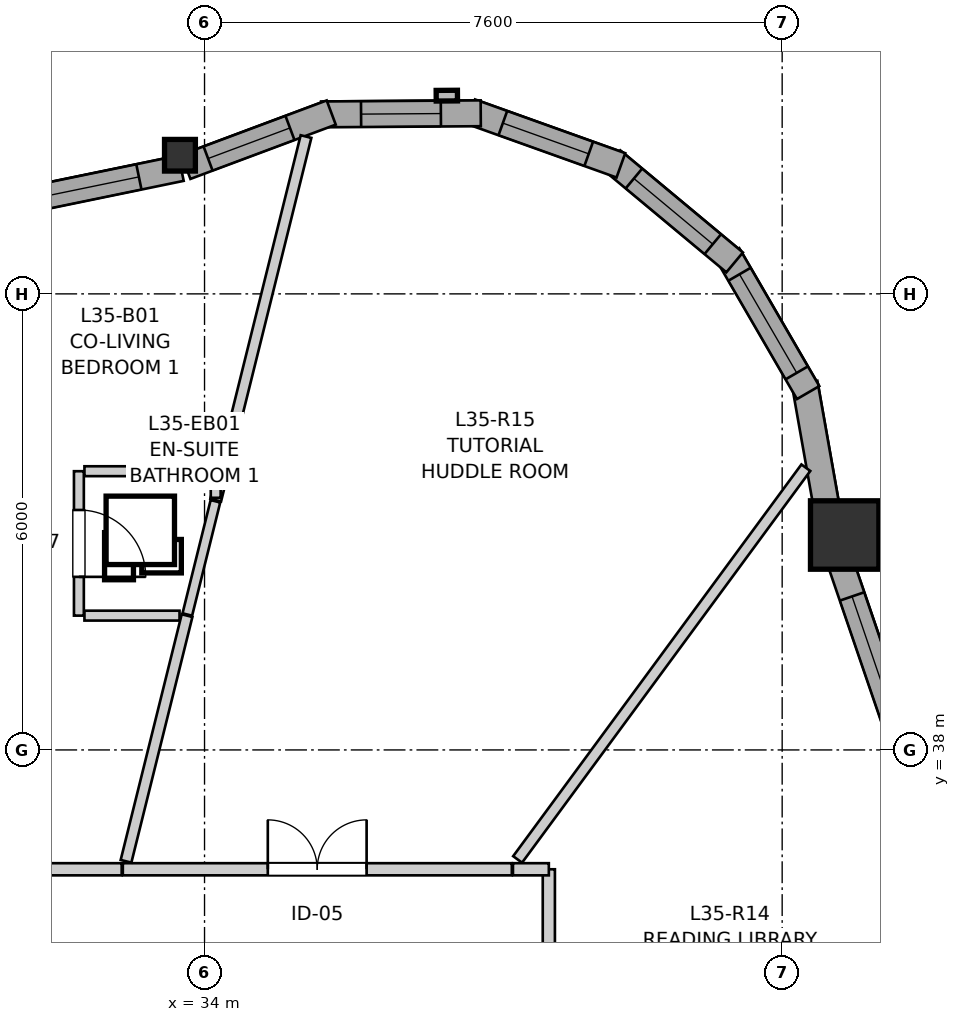
"""IFC4 building model, lengths in metres.
Left out: names, types, materials, properties, quantities, classifications, styles, units other than length and angle.
Written with IfcOpenShell. Run it as: python <this file> out.ifc"""

import sys

from ifc_helpers import new_model, si_unit, direction, frame, frame_2d, origin, origin_2d, place, context, subcontext, project, spatial, rectangle, i_section, extrude, source, transform, mapped, element, fill, save


model = new_model("IFC4")
c1 = context("Model", 3, precision=1e-05, world=origin(), true_north=direction((0.0, 1.0)))
c2 = subcontext(c1, "Body", "Model", "MODEL_VIEW")
j1 = project(units=[si_unit("LENGTHUNIT", "METRE"), si_unit("PLANEANGLEUNIT", "RADIAN")], contexts=[c1])
p1 = place(None, origin())
s1 = spatial("IfcSite", under=j1, at=p1, CompositionType="ELEMENT")
p2 = place(p1, origin())
s2 = spatial("IfcBuilding", under=s1, at=p2, CompositionType="ELEMENT")
p3 = place(p2, frame((0.0, 0.0, 118.4)))
s3 = spatial("IfcBuildingStorey", under=s2, at=p3, CompositionType="ELEMENT", Elevation=118.4)
m1 = source(origin(), c2, "Body", "SweptSolid", [
    extrude(rectangle(XDim=0.9, YDim=0.9, at=origin_2d()), origin(), (0.0, 0.0, 1.0), 2.95),
])
p4 = place(p3, frame((42.423, 40.828, 0.0), z_axis=(0.0, 0.0, 1.0), x_axis=(1.0, 0.0, 0.0)))
e1 = element("IfcColumn", 1, at=p4, inside=s3, PredefinedType="COLUMN", context=c2, shape_type="MappedRepresentation", body=[
    mapped(m1, transform((0.0, 0.0, 0.0), x_axis=(1.0, 0.0, 0.0), y_axis=(0.0, 1.0, 0.0), z_axis=(0.0, 0.0, 1.0), scale=1.0)),
])
m2 = source(origin(), c2, "Body", "SweptSolid", [
    extrude(i_section(OverallWidth=0.406, OverallDepth=0.416, WebThickness=0.027, FlangeThickness=0.044, FilletRadius=0.015, at=origin_2d()), origin(), (0.0, 0.0, 1.0), 2.95),
])
p5 = place(p3, frame((33.677, 45.824, 0.0), z_axis=(0.0, 0.0, 1.0), x_axis=(1.0, 0.0, 0.0)))
e2 = element("IfcColumn", 2, at=p5, inside=s3, PredefinedType="PILASTER", context=c2, shape_type="MappedRepresentation", body=[
    mapped(m2, transform((0.0, 0.0, 0.0), x_axis=(1.0, 0.0, 0.0), y_axis=(0.0, 1.0, 0.0), z_axis=(0.0, 0.0, 1.0), scale=1.0)),
])
p6 = place(p3, frame((43.288, 37.771, 0.0), z_axis=(0.0, 0.0, 1.0), x_axis=(-0.323537149191, 0.94621546864, 0.0)))
e3 = element("IfcWall", 3, at=p6, inside=s3, PredefinedType="SOLIDWALL", context=c2, shape_type="SweptSolid", body=[
    extrude(rectangle(XDim=2.942, YDim=0.34, at=frame_2d((1.471, 0.0))), origin(), (0.0, 0.0, 1.0), 2.48),
])
p7 = place(p6, frame((0.576, 0.0, 0.82)))
e4 = element("IfcOpeningElement", 4, at=p7, cuts=e3, PredefinedType="OPENING", context=c2, shape_type="SweptSolid", body=[
    extrude(rectangle(XDim=1.8, YDim=1.45, at=frame_2d((0.9, 0.725))), frame((0.0, 0.18, 0.0), z_axis=(0.0, -1.0, 0.0), x_axis=(1.0, 0.0, 0.0)), (0.0, 0.0, 1.0), 0.36),
])
p8 = place(p3, frame((42.215, 41.024, 0.0), z_axis=(0.0, 0.0, 1.0), x_axis=(-0.17440141227, 0.984674640375, 0.0)))
e5 = element("IfcWall", 5, at=p8, inside=s3, PredefinedType="SOLIDWALL", context=c2, shape_type="SweptSolid", body=[
    extrude(rectangle(XDim=1.831, YDim=0.34, at=frame_2d((0.916, 0.0))), origin(), (0.0, 0.0, 1.0), 2.48),
])
p9 = place(p3, frame((41.942, 42.701, 0.0), z_axis=(0.0, 0.0, 1.0), x_axis=(-0.501902596059, 0.864924149315, 0.0)))
e6 = element("IfcWall", 6, at=p9, inside=s3, PredefinedType="SOLIDWALL", context=c2, shape_type="SweptSolid", body=[
    extrude(rectangle(XDim=2.099, YDim=0.34, at=frame_2d((1.049, 0.0))), origin(), (0.0, 0.0, 1.0), 2.48),
])
p10 = place(p9, frame((0.3, 0.0, 0.82)))
e7 = element("IfcOpeningElement", 7, at=p10, cuts=e6, PredefinedType="OPENING", context=c2, shape_type="SweptSolid", body=[
    extrude(rectangle(XDim=1.5, YDim=1.45, at=frame_2d((0.75, 0.725))), frame((0.0, 0.18, 0.0), z_axis=(0.0, -1.0, 0.0), x_axis=(1.0, 0.0, 0.0)), (0.0, 0.0, 1.0), 0.36),
])
p11 = place(p3, frame((40.975, 44.414, 0.0), z_axis=(0.0, 0.0, 1.0), x_axis=(-0.768440501876, 0.639921241308, 0.0)))
e8 = element("IfcWall", 8, at=p11, inside=s3, PredefinedType="SOLIDWALL", context=c2, shape_type="SweptSolid", body=[
    extrude(rectangle(XDim=2.099, YDim=0.34, at=frame_2d((1.05, 0.0))), origin(), (0.0, 0.0, 1.0), 2.48),
])
p12 = place(p11, frame((0.375, 0.0, 0.82)))
e9 = element("IfcOpeningElement", 9, at=p12, cuts=e8, PredefinedType="OPENING", context=c2, shape_type="SweptSolid", body=[
    extrude(rectangle(XDim=1.35, YDim=1.45, at=frame_2d((0.675, 0.725))), frame((0.0, 0.18, 0.0), z_axis=(0.0, -1.0, 0.0), x_axis=(1.0, 0.0, 0.0)), (0.0, 0.0, 1.0), 0.36),
])
p13 = place(p3, frame((39.478, 45.691, 0.0), z_axis=(0.0, 0.0, 1.0), x_axis=(-0.941523304278, 0.336947870598, 0.0)))
e10 = element("IfcWall", 10, at=p13, inside=s3, PredefinedType="SOLIDWALL", context=c2, shape_type="SweptSolid", body=[
    extrude(rectangle(XDim=2.099, YDim=0.34, at=frame_2d((1.05, 0.0))), origin(), (0.0, 0.0, 1.0), 2.48),
])
p14 = place(p13, frame((0.449, 0.0, 0.82)))
e11 = element("IfcOpeningElement", 11, at=p14, cuts=e10, PredefinedType="OPENING", context=c2, shape_type="SweptSolid", body=[
    extrude(rectangle(XDim=1.2, YDim=1.45, at=frame_2d((0.6, 0.725))), frame((0.0, 0.18, 0.0), z_axis=(0.0, -1.0, 0.0), x_axis=(1.0, 0.0, 0.0)), (0.0, 0.0, 1.0), 0.36),
])
p15 = place(p3, frame((37.634, 46.376, 0.0), z_axis=(0.0, 0.0, 1.0), x_axis=(-0.999976456891, -0.00686189939, 0.0)))
e12 = element("IfcWall", 12, at=p15, inside=s3, PredefinedType="SOLIDWALL", context=c2, shape_type="SweptSolid", body=[
    extrude(rectangle(XDim=2.099, YDim=0.34, at=frame_2d((1.05, 0.0))), origin(), (0.0, 0.0, 1.0), 2.48),
])
p16 = place(p15, frame((0.524, 0.0, 0.82)))
e13 = element("IfcOpeningElement", 13, at=p16, cuts=e12, PredefinedType="OPENING", context=c2, shape_type="SweptSolid", body=[
    extrude(rectangle(XDim=1.05, YDim=1.45, at=frame_2d((0.525, 0.725))), frame((0.0, 0.18, 0.0), z_axis=(0.0, -1.0, 0.0), x_axis=(1.0, 0.0, 0.0)), (0.0, 0.0, 1.0), 0.36),
])
p17 = place(p3, frame((35.667, 46.386, 0.0), z_axis=(0.0, 0.0, 1.0), x_axis=(-0.936761017964, -0.34996970615, 0.0)))
e14 = element("IfcWall", 14, at=p17, inside=s3, PredefinedType="SOLIDWALL", context=c2, shape_type="SweptSolid", body=[
    extrude(rectangle(XDim=2.041, YDim=0.34, at=frame_2d((1.021, 0.0))), origin(), (0.0, 0.0, 1.0), 2.48),
])
p18 = place(p17, frame((0.579, 0.0, 0.82)))
e15 = element("IfcOpeningElement", 15, at=p18, cuts=e14, PredefinedType="OPENING", context=c2, shape_type="SweptSolid", body=[
    extrude(rectangle(XDim=1.15, YDim=1.2, at=frame_2d((0.575, 0.6))), frame((0.0, 0.18, 0.0), z_axis=(0.0, -1.0, 0.0), x_axis=(1.0, 0.0, 0.0)), (0.0, 0.0, 1.0), 0.36),
])
p19 = place(p3, frame((33.691, 45.653, 0.0), z_axis=(0.0, 0.0, 1.0), x_axis=(-0.979414063846, -0.201861565287, 0.0)))
e16 = element("IfcWall", 16, at=p19, inside=s3, PredefinedType="SOLIDWALL", context=c2, shape_type="SweptSolid", body=[
    extrude(rectangle(XDim=3.104, YDim=0.34, at=frame_2d((1.552, 0.0))), origin(), (0.0, 0.0, 1.0), 2.48),
])
p20 = place(p19, frame((0.567, 0.0, 0.82)))
e17 = element("IfcOpeningElement", 17, at=p20, cuts=e16, PredefinedType="OPENING", context=c2, shape_type="SweptSolid", body=[
    extrude(rectangle(XDim=1.95, YDim=1.4, at=frame_2d((0.975, 0.7))), frame((0.0, 0.18, 0.0), z_axis=(0.0, -1.0, 0.0), x_axis=(1.0, 0.0, 0.0)), (0.0, 0.0, 1.0), 0.36),
])
p21 = place(p3, frame((38.53, 36.43, 0.0), z_axis=(0.0, 0.0, 1.0), x_axis=(0.0, -1.0, 0.0)))
e18 = element("IfcWall", 18, at=p21, inside=s3, PredefinedType="PARTITIONING", context=c2, shape_type="SweptSolid", body=[
    extrude(rectangle(XDim=7.083, YDim=0.16, at=frame_2d((3.542, 0.0))), origin(), (0.0, 0.0, 1.0), 2.588),
])
p22 = place(p21, frame((3.053, 0.0, 0.0)))
e19 = element("IfcOpeningElement", 19, at=p22, cuts=e18, PredefinedType="OPENING", context=c2, shape_type="SweptSolid", body=[
    extrude(rectangle(XDim=0.96, YDim=2.1, at=frame_2d((0.48, 1.05))), frame((0.0, 0.09, 0.0), z_axis=(0.0, -1.0, 0.0), x_axis=(1.0, 0.0, 0.0)), (0.0, 0.0, 1.0), 0.18),
])
p23 = place(p3, frame((32.925, 36.43, 0.0), z_axis=(0.0, 0.0, 1.0), x_axis=(1.0, 0.0, 0.0)))
e20 = element("IfcWall", 20, at=p23, inside=s3, PredefinedType="PARTITIONING", context=c2, shape_type="SweptSolid", body=[
    extrude(rectangle(XDim=5.118, YDim=0.16, at=frame_2d((2.559, 0.0))), origin(), (0.0, 0.0, 1.0), 2.588),
])
p24 = place(p23, frame((1.907, 0.0, 0.0)))
e21 = element("IfcOpeningElement", 21, at=p24, cuts=e20, PredefinedType="OPENING", context=c2, shape_type="SweptSolid", body=[
    extrude(rectangle(XDim=1.3, YDim=2.1, at=frame_2d((0.65, 1.05))), frame((0.0, 0.09, 0.0), z_axis=(0.0, -1.0, 0.0), x_axis=(1.0, 0.0, 0.0)), (0.0, 0.0, 1.0), 0.18),
])
p25 = place(p3, frame((30.063, 36.43, 0.0), z_axis=(0.0, 0.0, 1.0), x_axis=(1.0, 0.0, 0.0)))
e22 = element("IfcWall", 22, at=p25, inside=s3, PredefinedType="PARTITIONING", context=c2, shape_type="SweptSolid", body=[
    extrude(rectangle(XDim=2.847, YDim=0.16, at=frame_2d((1.423, 0.0))), origin(), (0.0, 0.0, 1.0), 2.95),
])
p26 = place(p25, frame((0.964, 0.0, 0.0)))
e23 = element("IfcOpeningElement", 23, at=p26, cuts=e22, PredefinedType="OPENING", context=c2, shape_type="SweptSolid", body=[
    extrude(rectangle(XDim=0.92, YDim=2.1, at=frame_2d((0.46, 1.05))), frame((0.0, 0.09, 0.0), z_axis=(0.0, -1.0, 0.0), x_axis=(1.0, 0.0, 0.0)), (0.0, 0.0, 1.0), 0.18),
])
p27 = place(p3, frame((32.347, 41.667, 0.0), z_axis=(0.0, 0.0, 1.0), x_axis=(0.0, -1.0, 0.0)))
e24 = element("IfcWall", 24, at=p27, inside=s3, PredefinedType="PARTITIONING", context=c2, shape_type="SweptSolid", body=[
    extrude(rectangle(XDim=1.9, YDim=0.13, at=frame_2d((0.95, 0.0))), origin(), (0.0, 0.0, 1.0), 2.95),
])
p28 = place(p27, frame((0.51, 0.0, 0.0)))
e25 = element("IfcOpeningElement", 25, at=p28, cuts=e24, PredefinedType="OPENING", context=c2, shape_type="SweptSolid", body=[
    extrude(rectangle(XDim=0.88, YDim=2.05, at=frame_2d((0.44, 1.025))), frame((0.0, 0.075, 0.0), z_axis=(0.0, -1.0, 0.0), x_axis=(1.0, 0.0, 0.0)), (0.0, 0.0, 1.0), 0.15),
])
p29 = place(p3, frame((38.119, 36.559, 0.0), z_axis=(0.0, 0.0, 1.0), x_axis=(0.592704345809, 0.805420113021, 0.0)))
e26 = element("IfcWall", 26, at=p29, inside=s3, PredefinedType="PARTITIONING", context=c2, shape_type="SweptSolid", body=[
    extrude(rectangle(XDim=6.399, YDim=0.145, at=frame_2d((3.199, 0.0))), origin(), (0.0, 0.0, 1.0), 2.95),
])
p30 = place(p3, frame((34.147, 41.286, 0.0), z_axis=(0.0, 0.0, 1.0), x_axis=(0.241055314039, 0.970511378384, 0.0)))
e27 = element("IfcWall", 27, at=p30, inside=s3, PredefinedType="PARTITIONING", context=c2, shape_type="SweptSolid", body=[
    extrude(rectangle(XDim=4.929, YDim=0.145, at=frame_2d((2.465, 0.0))), origin(), (0.0, 0.0, 1.0), 2.95),
])
p31 = place(p3, frame((32.967, 36.535, 0.0), z_axis=(0.0, 0.0, 1.0), x_axis=(0.241120890255, 0.970495088232, 0.0)))
e28 = element("IfcWall", 28, at=p31, inside=s3, PredefinedType="PARTITIONING", context=c2, shape_type="SweptSolid", body=[
    extrude(rectangle(XDim=3.33, YDim=0.145, at=frame_2d((1.665, 0.0))), origin(), (0.0, 0.0, 1.0), 2.95),
])
p32 = place(p3, frame((32.42, 41.667, 0.0), z_axis=(0.0, 0.0, 1.0), x_axis=(1.0, 0.0, 0.0)))
e29 = element("IfcWall", 29, at=p32, inside=s3, PredefinedType="PARTITIONING", context=c2, shape_type="SweptSolid", body=[
    extrude(rectangle(XDim=1.628, YDim=0.13, at=frame_2d((0.814, 0.0))), origin(), (0.0, 0.0, 1.0), 2.95),
])
p33 = place(p3, frame((33.774, 39.781, 0.0), z_axis=(0.0, 0.0, 1.0), x_axis=(0.240776504653, 0.970580586457, 0.0)))
e30 = element("IfcWall", 30, at=p33, inside=s3, PredefinedType="PARTITIONING", context=c2, shape_type="SweptSolid", body=[
    extrude(rectangle(XDim=1.535, YDim=0.13, at=frame_2d((0.768, 0.0))), origin(), (0.0, 0.0, 1.0), 2.95),
])
p34 = place(p3, frame((32.42, 39.767, 0.0), z_axis=(0.0, 0.0, 1.0), x_axis=(1.0, 0.0, 0.0)))
e31 = element("IfcWall", 31, at=p34, inside=s3, PredefinedType="PARTITIONING", context=c2, shape_type="SweptSolid", body=[
    extrude(rectangle(XDim=1.251, YDim=0.13, at=frame_2d((0.625, 0.0))), origin(), (0.0, 0.0, 1.0), 2.95),
])
p35 = place(p3, frame((38.058, 36.43, 0.0), z_axis=(0.0, 0.0, 1.0), x_axis=(1.0, 0.0, 0.0)))
e32 = element("IfcWall", 32, at=p35, inside=s3, PredefinedType="PARTITIONING", context=c2, shape_type="SweptSolid", body=[
    extrude(rectangle(XDim=0.472, YDim=0.16, at=frame_2d((0.236, 0.0))), origin(), (0.0, 0.0, 1.0), 2.588),
])
p36 = place(p3, frame((34.147, 41.317, 0.0), z_axis=(0.0, 0.0, 1.0), x_axis=(0.0, 1.0, 0.0)))
e33 = element("IfcWall", 33, at=p36, inside=s3, PredefinedType="PARTITIONING", context=c2, shape_type="SweptSolid", body=[
    extrude(rectangle(XDim=0.35, YDim=0.13, at=frame_2d((0.175, 0.0))), origin(), (0.0, 0.0, 1.0), 2.95),
])
m3 = source(origin(), c2, "Body", "SweptSolid", [
    extrude(rectangle(XDim=1.8, YDim=1.45, at=frame_2d((0.9, 0.725))), frame((0.0, 0.03, 0.0), z_axis=(0.0, -1.0, 0.0), x_axis=(1.0, 0.0, 0.0)), (0.0, 0.0, 1.0), 0.06),
])
p37 = place(p7, origin())
e34 = element("IfcWindow", 34, at=p37, inside=s3, PartitioningType="SINGLE_PANEL", PredefinedType="WINDOW", context=c2, shape_type="MappedRepresentation", body=[
    mapped(m3, transform((0.0, 0.0, 0.0), x_axis=(1.0, 0.0, 0.0), y_axis=(0.0, 1.0, 0.0), z_axis=(0.0, 0.0, 1.0), scale=1.0)),
])
fill(e4, e34)
m4 = source(origin(), c2, "Body", "SweptSolid", [
    extrude(rectangle(XDim=1.5, YDim=1.45, at=frame_2d((0.75, 0.725))), frame((0.0, 0.03, 0.0), z_axis=(0.0, -1.0, 0.0), x_axis=(1.0, 0.0, 0.0)), (0.0, 0.0, 1.0), 0.06),
])
p38 = place(p10, origin())
e35 = element("IfcWindow", 35, at=p38, inside=s3, PartitioningType="SINGLE_PANEL", PredefinedType="WINDOW", context=c2, shape_type="MappedRepresentation", body=[
    mapped(m4, transform((0.0, 0.0, 0.0), x_axis=(1.0, 0.0, 0.0), y_axis=(0.0, 1.0, 0.0), z_axis=(0.0, 0.0, 1.0), scale=1.0)),
])
fill(e7, e35)
m5 = source(origin(), c2, "Body", "SweptSolid", [
    extrude(rectangle(XDim=1.35, YDim=1.45, at=frame_2d((0.675, 0.725))), frame((0.0, 0.03, 0.0), z_axis=(0.0, -1.0, 0.0), x_axis=(1.0, 0.0, 0.0)), (0.0, 0.0, 1.0), 0.06),
])
p39 = place(p12, origin())
e36 = element("IfcWindow", 36, at=p39, inside=s3, PartitioningType="SINGLE_PANEL", PredefinedType="WINDOW", context=c2, shape_type="MappedRepresentation", body=[
    mapped(m5, transform((0.0, 0.0, 0.0), x_axis=(1.0, 0.0, 0.0), y_axis=(0.0, 1.0, 0.0), z_axis=(0.0, 0.0, 1.0), scale=1.0)),
])
fill(e9, e36)
m6 = source(origin(), c2, "Body", "SweptSolid", [
    extrude(rectangle(XDim=1.2, YDim=1.45, at=frame_2d((0.6, 0.725))), frame((0.0, 0.03, 0.0), z_axis=(0.0, -1.0, 0.0), x_axis=(1.0, 0.0, 0.0)), (0.0, 0.0, 1.0), 0.06),
])
p40 = place(p14, origin())
e37 = element("IfcWindow", 37, at=p40, inside=s3, PartitioningType="SINGLE_PANEL", PredefinedType="WINDOW", context=c2, shape_type="MappedRepresentation", body=[
    mapped(m6, transform((0.0, 0.0, 0.0), x_axis=(1.0, 0.0, 0.0), y_axis=(0.0, 1.0, 0.0), z_axis=(0.0, 0.0, 1.0), scale=1.0)),
])
fill(e11, e37)
m7 = source(origin(), c2, "Body", "SweptSolid", [
    extrude(rectangle(XDim=1.05, YDim=1.45, at=frame_2d((0.525, 0.725))), frame((0.0, 0.03, 0.0), z_axis=(0.0, -1.0, 0.0), x_axis=(1.0, 0.0, 0.0)), (0.0, 0.0, 1.0), 0.06),
])
p41 = place(p16, origin())
e38 = element("IfcWindow", 38, at=p41, inside=s3, PartitioningType="SINGLE_PANEL", PredefinedType="WINDOW", context=c2, shape_type="MappedRepresentation", body=[
    mapped(m7, transform((0.0, 0.0, 0.0), x_axis=(1.0, 0.0, 0.0), y_axis=(0.0, 1.0, 0.0), z_axis=(0.0, 0.0, 1.0), scale=1.0)),
])
fill(e13, e38)
m8 = source(origin(), c2, "Body", "SweptSolid", [
    extrude(rectangle(XDim=1.15, YDim=1.2, at=frame_2d((0.575, 0.6))), frame((0.0, 0.03, 0.0), z_axis=(0.0, -1.0, 0.0), x_axis=(1.0, 0.0, 0.0)), (0.0, 0.0, 1.0), 0.06),
])
p42 = place(p18, origin())
e39 = element("IfcWindow", 39, at=p42, inside=s3, PartitioningType="SINGLE_PANEL", PredefinedType="WINDOW", context=c2, shape_type="MappedRepresentation", body=[
    mapped(m8, transform((0.0, 0.0, 0.0), x_axis=(1.0, 0.0, 0.0), y_axis=(0.0, 1.0, 0.0), z_axis=(0.0, 0.0, 1.0), scale=1.0)),
])
fill(e15, e39)
m9 = source(origin(), c2, "Body", "SweptSolid", [
    extrude(rectangle(XDim=1.95, YDim=1.4, at=frame_2d((0.975, 0.7))), frame((0.0, 0.03, 0.0), z_axis=(0.0, -1.0, 0.0), x_axis=(1.0, 0.0, 0.0)), (0.0, 0.0, 1.0), 0.06),
])
p43 = place(p20, origin())
e40 = element("IfcWindow", 40, at=p43, inside=s3, PartitioningType="SINGLE_PANEL", PredefinedType="WINDOW", context=c2, shape_type="MappedRepresentation", body=[
    mapped(m9, transform((0.0, 0.0, 0.0), x_axis=(1.0, 0.0, 0.0), y_axis=(0.0, 1.0, 0.0), z_axis=(0.0, 0.0, 1.0), scale=1.0)),
])
fill(e17, e40)
m10 = source(origin(), c2, "Body", "SweptSolid", [
    extrude(rectangle(XDim=1.3, YDim=2.1, at=frame_2d((0.65, 1.05))), frame((0.0, 0.025, 0.0), z_axis=(0.0, -1.0, 0.0), x_axis=(1.0, 0.0, 0.0)), (0.0, 0.0, 1.0), 0.05),
])
p44 = place(p24, origin())
e41 = element("IfcDoor", 41, at=p44, inside=s3, OperationType="DOUBLE_DOOR_SINGLE_SWING", PredefinedType="DOOR", context=c2, shape_type="MappedRepresentation", body=[
    mapped(m10, transform((0.0, 0.0, 0.0), x_axis=(1.0, 0.0, 0.0), y_axis=(0.0, 1.0, 0.0), z_axis=(0.0, 0.0, 1.0), scale=1.0)),
])
fill(e21, e41)
m11 = source(origin(), c2, "Body", "SweptSolid", [
    extrude(rectangle(XDim=0.88, YDim=2.05, at=frame_2d((0.44, 1.025))), frame((0.0, 0.025, 0.0), z_axis=(0.0, -1.0, 0.0), x_axis=(1.0, 0.0, 0.0)), (0.0, 0.0, 1.0), 0.05),
])
p45 = place(p28, origin())
e42 = element("IfcDoor", 42, at=p45, inside=s3, OperationType="SINGLE_SWING_RIGHT", PredefinedType="DOOR", context=c2, shape_type="MappedRepresentation", body=[
    mapped(m11, transform((0.0, 0.0, 0.0), x_axis=(1.0, 0.0, 0.0), y_axis=(0.0, 1.0, 0.0), z_axis=(0.0, 0.0, 1.0), scale=1.0)),
])
fill(e25, e42)
save(model, sys.argv[1])
